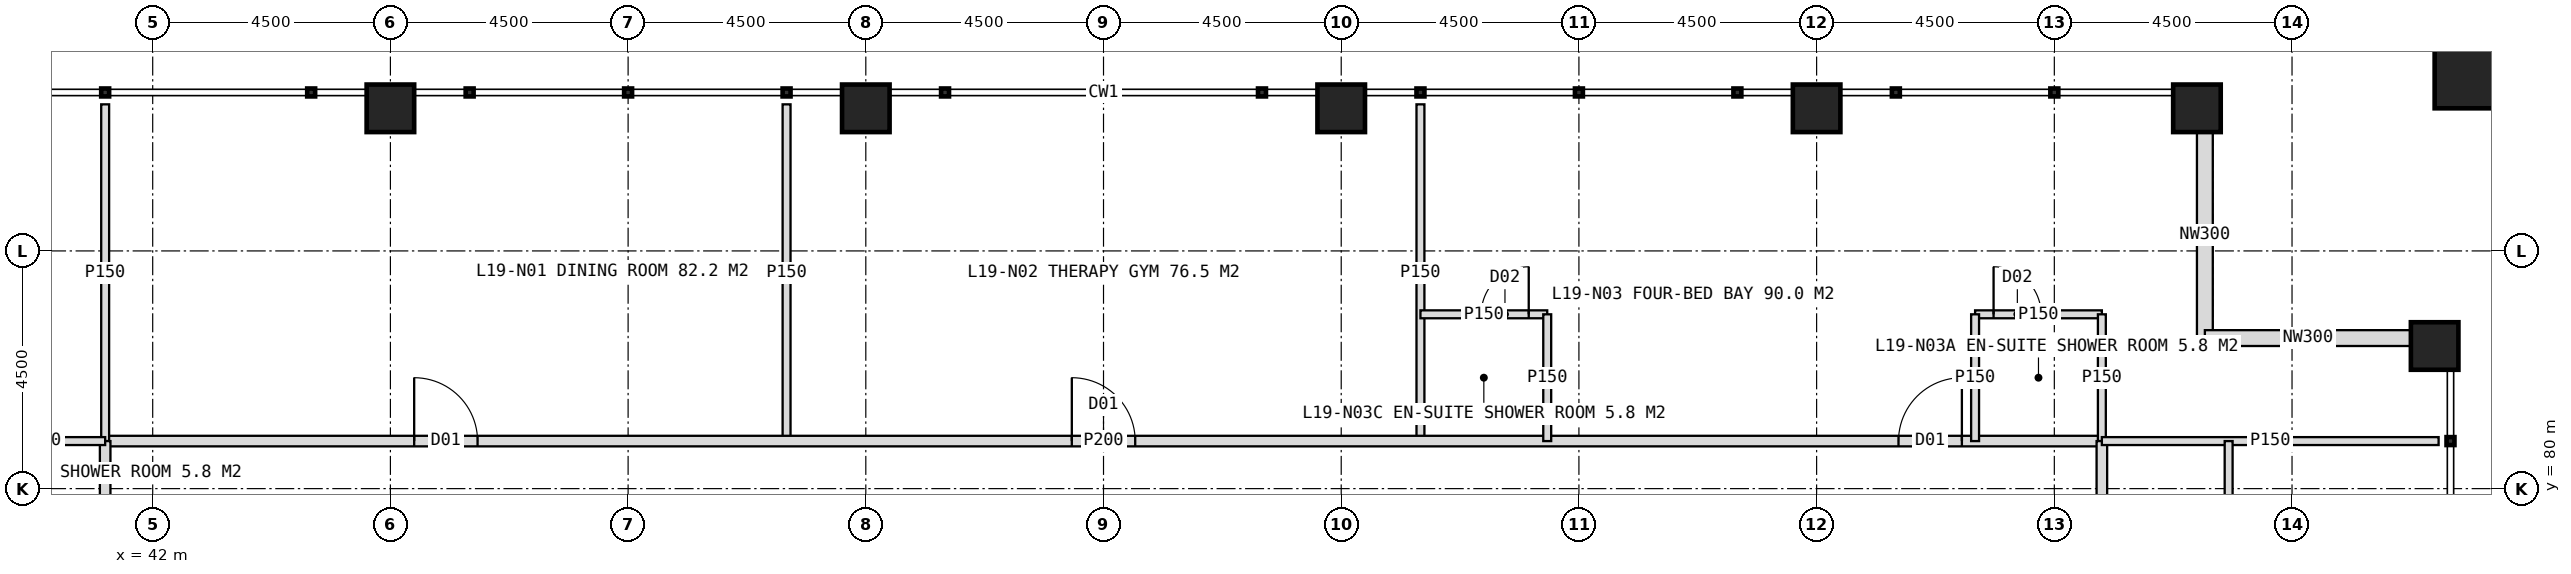
"""IFC4 building model, lengths in metres.
Left out: names, types, materials, properties, quantities, classifications, styles, units other than length and angle.
Written with IfcOpenShell. Run it as: python <this file> out.ifc"""

import sys

from ifc_helpers import new_model, si_unit, direction, frame, frame_2d, origin, origin_2d, place, context, subcontext, project, spatial, rectangle, hollow_rectangle, extrude, element, fill, save


model = new_model("IFC4")
c1 = context("Model", 3, precision=1e-05, world=origin(), true_north=direction((0.0, 1.0)))
c2 = subcontext(c1, "Body", "Model", "MODEL_VIEW")
j1 = project(units=[si_unit("LENGTHUNIT", "METRE"), si_unit("PLANEANGLEUNIT", "RADIAN")], contexts=[c1])
p1 = place(None, origin())
s1 = spatial("IfcSite", under=j1, at=p1, CompositionType="ELEMENT")
p2 = place(p1, origin())
s2 = spatial("IfcBuilding", under=s1, at=p2, CompositionType="ELEMENT")
p3 = place(p2, frame((0.0, 0.0, 83.0)))
s3 = spatial("IfcBuildingStorey", under=s2, at=p3, CompositionType="ELEMENT", Elevation=83.0)
for number, where, z_axis, x_axis in (
    (1, (46.5, 87.2, 0.0), (0.0, 0.0, 1.0), (1.0, 0.0, 0.0)),
    (2, (55.5, 87.2, 0.0), (0.0, 0.0, 1.0), (1.0, 0.0, 0.0)),
    (3, (64.5, 87.2, 0.0), (0.0, 0.0, 1.0), (1.0, 0.0, 0.0)),
    (4, (73.5, 87.2, 0.0), (0.0, 0.0, 1.0), (1.0, 0.0, 0.0)),
    (5, (80.7, 87.2, 0.0), (0.0, 0.0, 1.0), (1.0, 0.0, 0.0)),
    (6, (85.2, 82.7, 0.0), (0.0, 0.0, 1.0), (1.0, 0.0, 0.0)),
):
    element("IfcColumn", number, at=place(p3, frame(where, z_axis=z_axis, x_axis=x_axis)), inside=s3, PredefinedType="COLUMN", context=c2, shape_type="SweptSolid", body=[
        extrude(hollow_rectangle(XDim=0.9, YDim=0.9, WallThickness=0.08, at=origin_2d()), origin(), (0.0, 0.0, 1.0), 4.0),
    ])
p4 = place(p3, frame((86.1, 88.1, 0.0), z_axis=(0.0, 0.0, 1.0), x_axis=(1.0, 0.0, 0.0)))
e7 = element("IfcColumn", 7, at=p4, inside=s3, PredefinedType="COLUMN", context=c2, shape_type="SweptSolid", body=[
    extrude(hollow_rectangle(XDim=1.8, YDim=1.8, WallThickness=0.1, at=origin_2d()), origin(), (0.0, 0.0, 1.0), 4.0),
])
for number, where, z_axis, x_axis in (
    (8, (80.85, 86.75, 0.0), (0.0, 0.0, 1.0), (0.0, -1.0, 0.0)),
    (9, (80.85, 82.85, 0.0), (0.0, 0.0, 1.0), (1.0, 0.0, 0.0)),
):
    element("IfcWall", number, at=place(p3, frame(where, z_axis=z_axis, x_axis=x_axis)), inside=s3, PredefinedType="ELEMENTEDWALL", context=c2, shape_type="SweptSolid", body=[
        extrude(rectangle(XDim=3.9, YDim=0.3, at=frame_2d((1.95, 0.0))), origin(), (0.0, 0.0, 1.0), 2.95),
    ])
for number, where, z_axis, x_axis in (
    (10, (54.0, 80.9, 0.0), (0.0, 0.0, 1.0), (0.0, 1.0, 0.0)),
    (11, (66.0, 80.9, 0.0), (0.0, 0.0, 1.0), (0.0, 1.0, 0.0)),
):
    element("IfcWall", number, at=place(p3, frame(where, z_axis=z_axis, x_axis=x_axis)), inside=s3, PredefinedType="PARTITIONING", context=c2, shape_type="SweptSolid", body=[
        extrude(rectangle(XDim=6.375, YDim=0.15, at=frame_2d((3.188, 0.0))), origin(), (0.0, 0.0, 1.0), 3.75),
    ])
p5 = place(p3, frame((41.1, 80.9, 0.0), z_axis=(0.0, 0.0, 1.0), x_axis=(1.0, 0.0, 0.0)))
e12 = element("IfcWall", 12, at=p5, inside=s3, PredefinedType="PARTITIONING", context=c2, shape_type="SweptSolid", body=[
    extrude(rectangle(XDim=37.8, YDim=0.2, at=frame_2d((18.9, 0.0))), origin(), (0.0, 0.0, 1.0), 3.75),
])
p6 = place(p5, frame((5.85, 0.0, 0.0)))
e13 = element("IfcOpeningElement", 13, at=p6, cuts=e12, PredefinedType="OPENING", context=c2, shape_type="SweptSolid", body=[
    extrude(rectangle(XDim=1.2, YDim=2.2, at=frame_2d((0.6, 1.1))), frame((0.0, 0.11, 0.0), z_axis=(0.0, -1.0, 0.0), x_axis=(1.0, 0.0, 0.0)), (0.0, 0.0, 1.0), 0.22),
])
p7 = place(p5, frame((18.3, 0.0, 0.0)))
e14 = element("IfcOpeningElement", 14, at=p7, cuts=e12, PredefinedType="OPENING", context=c2, shape_type="SweptSolid", body=[
    extrude(rectangle(XDim=1.2, YDim=2.2, at=frame_2d((0.6, 1.1))), frame((0.0, 0.11, 0.0), z_axis=(0.0, -1.0, 0.0), x_axis=(1.0, 0.0, 0.0)), (0.0, 0.0, 1.0), 0.22),
])
p8 = place(p5, frame((33.95, 0.0, 0.0)))
e15 = element("IfcOpeningElement", 15, at=p8, cuts=e12, PredefinedType="OPENING", context=c2, shape_type="SweptSolid", body=[
    extrude(rectangle(XDim=1.2, YDim=2.2, at=frame_2d((0.6, 1.1))), frame((0.0, 0.11, 0.0), z_axis=(0.0, -1.0, 0.0), x_axis=(1.0, 0.0, 0.0)), (0.0, 0.0, 1.0), 0.22),
])
p9 = place(p3, frame((41.1, 80.9, 0.0), z_axis=(0.0, 0.0, 1.0), x_axis=(0.0, 1.0, 0.0)))
e16 = element("IfcWall", 16, at=p9, inside=s3, PredefinedType="PARTITIONING", context=c2, shape_type="SweptSolid", body=[
    extrude(rectangle(XDim=6.375, YDim=0.15, at=frame_2d((3.188, 0.0))), origin(), (0.0, 0.0, 1.0), 3.75),
])
p10 = place(p3, frame((76.5, 83.3, 0.0), z_axis=(0.0, 0.0, 1.0), x_axis=(1.0, 0.0, 0.0)))
e17 = element("IfcWall", 17, at=p10, inside=s3, PredefinedType="PARTITIONING", context=c2, shape_type="SweptSolid", body=[
    extrude(rectangle(XDim=2.4, YDim=0.15, at=frame_2d((1.2, 0.0))), origin(), (0.0, 0.0, 1.0), 3.75),
])
p11 = place(p10, frame((0.35, 0.0, 0.0)))
e18 = element("IfcOpeningElement", 18, at=p11, cuts=e17, PredefinedType="OPENING", context=c2, shape_type="SweptSolid", body=[
    extrude(rectangle(XDim=0.9, YDim=2.1, at=frame_2d((0.45, 1.05))), frame((0.0, 0.085, 0.0), z_axis=(0.0, -1.0, 0.0), x_axis=(1.0, 0.0, 0.0)), (0.0, 0.0, 1.0), 0.17),
])
p12 = place(p3, frame((76.5, 80.9, 0.0), z_axis=(0.0, 0.0, 1.0), x_axis=(0.0, 1.0, 0.0)))
e19 = element("IfcWall", 19, at=p12, inside=s3, PredefinedType="PARTITIONING", context=c2, shape_type="SweptSolid", body=[
    extrude(rectangle(XDim=2.4, YDim=0.15, at=frame_2d((1.2, 0.0))), origin(), (0.0, 0.0, 1.0), 3.75),
])
p13 = place(p3, frame((66.0, 83.3, 0.0), z_axis=(0.0, 0.0, 1.0), x_axis=(1.0, 0.0, 0.0)))
e20 = element("IfcWall", 20, at=p13, inside=s3, PredefinedType="PARTITIONING", context=c2, shape_type="SweptSolid", body=[
    extrude(rectangle(XDim=2.4, YDim=0.15, at=frame_2d((1.2, 0.0))), origin(), (0.0, 0.0, 1.0), 3.75),
])
p14 = place(p13, frame((1.15, 0.0, 0.0)))
e21 = element("IfcOpeningElement", 21, at=p14, cuts=e20, PredefinedType="OPENING", context=c2, shape_type="SweptSolid", body=[
    extrude(rectangle(XDim=0.9, YDim=2.1, at=frame_2d((0.45, 1.05))), frame((0.0, 0.085, 0.0), z_axis=(0.0, -1.0, 0.0), x_axis=(1.0, 0.0, 0.0)), (0.0, 0.0, 1.0), 0.17),
])
for number, where, z_axis, x_axis in (
    (22, (68.4, 80.9, 0.0), (0.0, 0.0, 1.0), (0.0, 1.0, 0.0)),
    (23, (78.9, 80.9, 0.0), (0.0, 0.0, 1.0), (0.0, 1.0, 0.0)),
):
    element("IfcWall", number, at=place(p3, frame(where, z_axis=z_axis, x_axis=x_axis)), inside=s3, PredefinedType="PARTITIONING", context=c2, shape_type="SweptSolid", body=[
        extrude(rectangle(XDim=2.4, YDim=0.15, at=frame_2d((1.2, 0.0))), origin(), (0.0, 0.0, 1.0), 3.75),
    ])
p15 = place(p3, frame((41.1, 43.1, 0.0), z_axis=(0.0, 0.0, 1.0), x_axis=(0.0, 1.0, 0.0)))
e24 = element("IfcWall", 24, at=p15, inside=s3, PredefinedType="PARTITIONING", context=c2, shape_type="SweptSolid", body=[
    extrude(rectangle(XDim=37.8, YDim=0.2, at=frame_2d((18.9, 0.0))), origin(), (0.0, 0.0, 1.0), 3.75),
])
p16 = place(p15, frame((2.45, 0.0, 0.0)))
e25 = element("IfcOpeningElement", 25, at=p16, cuts=e24, PredefinedType="OPENING", context=c2, shape_type="SweptSolid", body=[
    extrude(rectangle(XDim=1.2, YDim=2.2, at=frame_2d((0.6, 1.1))), frame((0.0, 0.11, 0.0), z_axis=(0.0, -1.0, 0.0), x_axis=(1.0, 0.0, 0.0)), (0.0, 0.0, 1.0), 0.22),
])
p17 = place(p15, frame((9.55, 0.0, 0.0)))
e26 = element("IfcOpeningElement", 26, at=p17, cuts=e24, PredefinedType="OPENING", context=c2, shape_type="SweptSolid", body=[
    extrude(rectangle(XDim=1.2, YDim=2.2, at=frame_2d((0.6, 1.1))), frame((0.0, 0.11, 0.0), z_axis=(0.0, -1.0, 0.0), x_axis=(1.0, 0.0, 0.0)), (0.0, 0.0, 1.0), 0.22),
])
p18 = place(p15, frame((15.05, 0.0, 0.0)))
e27 = element("IfcOpeningElement", 27, at=p18, cuts=e24, PredefinedType="OPENING", context=c2, shape_type="SweptSolid", body=[
    extrude(rectangle(XDim=1.2, YDim=2.2, at=frame_2d((0.6, 1.1))), frame((0.0, 0.11, 0.0), z_axis=(0.0, -1.0, 0.0), x_axis=(1.0, 0.0, 0.0)), (0.0, 0.0, 1.0), 0.22),
])
p19 = place(p15, frame((21.55, 0.0, 0.0)))
e28 = element("IfcOpeningElement", 28, at=p19, cuts=e24, PredefinedType="OPENING", context=c2, shape_type="SweptSolid", body=[
    extrude(rectangle(XDim=1.2, YDim=2.2, at=frame_2d((0.6, 1.1))), frame((0.0, 0.11, 0.0), z_axis=(0.0, -1.0, 0.0), x_axis=(1.0, 0.0, 0.0)), (0.0, 0.0, 1.0), 0.22),
])
p20 = place(p15, frame((33.95, 0.0, 0.0)))
e29 = element("IfcOpeningElement", 29, at=p20, cuts=e24, PredefinedType="OPENING", context=c2, shape_type="SweptSolid", body=[
    extrude(rectangle(XDim=1.2, YDim=2.2, at=frame_2d((0.6, 1.1))), frame((0.0, 0.11, 0.0), z_axis=(0.0, -1.0, 0.0), x_axis=(1.0, 0.0, 0.0)), (0.0, 0.0, 1.0), 0.22),
])
p21 = place(p3, frame((41.1, 80.9, 0.0), z_axis=(0.0, 0.0, 1.0), x_axis=(-1.0, 0.0, 0.0)))
e30 = element("IfcWall", 30, at=p21, inside=s3, PredefinedType="PARTITIONING", context=c2, shape_type="SweptSolid", body=[
    extrude(rectangle(XDim=2.4, YDim=0.15, at=frame_2d((1.2, 0.0))), origin(), (0.0, 0.0, 1.0), 3.75),
])
p22 = place(p3, frame((78.9, 80.9, 0.0), z_axis=(0.0, 0.0, 1.0), x_axis=(0.0, -1.0, 0.0)))
e31 = element("IfcWall", 31, at=p22, inside=s3, PredefinedType="PARTITIONING", context=c2, shape_type="SweptSolid", body=[
    extrude(rectangle(XDim=37.8, YDim=0.2, at=frame_2d((18.9, 0.0))), origin(), (0.0, 0.0, 1.0), 3.75),
])
p23 = place(p22, frame((2.45, 0.0, 0.0)))
e32 = element("IfcOpeningElement", 32, at=p23, cuts=e31, PredefinedType="OPENING", context=c2, shape_type="SweptSolid", body=[
    extrude(rectangle(XDim=1.2, YDim=2.2, at=frame_2d((0.6, 1.1))), frame((0.0, 0.11, 0.0), z_axis=(0.0, -1.0, 0.0), x_axis=(1.0, 0.0, 0.0)), (0.0, 0.0, 1.0), 0.22),
])
p24 = place(p22, frame((9.55, 0.0, 0.0)))
e33 = element("IfcOpeningElement", 33, at=p24, cuts=e31, PredefinedType="OPENING", context=c2, shape_type="SweptSolid", body=[
    extrude(rectangle(XDim=1.2, YDim=2.2, at=frame_2d((0.6, 1.1))), frame((0.0, 0.11, 0.0), z_axis=(0.0, -1.0, 0.0), x_axis=(1.0, 0.0, 0.0)), (0.0, 0.0, 1.0), 0.22),
])
p25 = place(p22, frame((15.05, 0.0, 0.0)))
e34 = element("IfcOpeningElement", 34, at=p25, cuts=e31, PredefinedType="OPENING", context=c2, shape_type="SweptSolid", body=[
    extrude(rectangle(XDim=1.2, YDim=2.2, at=frame_2d((0.6, 1.1))), frame((0.0, 0.11, 0.0), z_axis=(0.0, -1.0, 0.0), x_axis=(1.0, 0.0, 0.0)), (0.0, 0.0, 1.0), 0.22),
])
p26 = place(p22, frame((21.55, 0.0, 0.0)))
e35 = element("IfcOpeningElement", 35, at=p26, cuts=e31, PredefinedType="OPENING", context=c2, shape_type="SweptSolid", body=[
    extrude(rectangle(XDim=1.2, YDim=2.2, at=frame_2d((0.6, 1.1))), frame((0.0, 0.11, 0.0), z_axis=(0.0, -1.0, 0.0), x_axis=(1.0, 0.0, 0.0)), (0.0, 0.0, 1.0), 0.22),
])
p27 = place(p22, frame((33.95, 0.0, 0.0)))
e36 = element("IfcOpeningElement", 36, at=p27, cuts=e31, PredefinedType="OPENING", context=c2, shape_type="SweptSolid", body=[
    extrude(rectangle(XDim=1.2, YDim=2.2, at=frame_2d((0.6, 1.1))), frame((0.0, 0.11, 0.0), z_axis=(0.0, -1.0, 0.0), x_axis=(1.0, 0.0, 0.0)), (0.0, 0.0, 1.0), 0.22),
])
p28 = place(p3, frame((78.9, 80.9, 0.0), z_axis=(0.0, 0.0, 1.0), x_axis=(1.0, 0.0, 0.0)))
e37 = element("IfcWall", 37, at=p28, inside=s3, PredefinedType="PARTITIONING", context=c2, shape_type="SweptSolid", body=[
    extrude(rectangle(XDim=6.375, YDim=0.15, at=frame_2d((3.188, 0.0))), origin(), (0.0, 0.0, 1.0), 3.75),
])
p29 = place(p3, frame((81.3, 80.9, 0.0), z_axis=(0.0, 0.0, 1.0), x_axis=(0.0, -1.0, 0.0)))
e38 = element("IfcWall", 38, at=p29, inside=s3, PredefinedType="PARTITIONING", context=c2, shape_type="SweptSolid", body=[
    extrude(rectangle(XDim=3.9, YDim=0.15, at=frame_2d((1.95, 0.0))), origin(), (0.0, 0.0, 1.0), 3.75),
])
p30 = place(p29, frame((2.45, 0.0, 0.0)))
e39 = element("IfcOpeningElement", 39, at=p30, cuts=e38, PredefinedType="OPENING", context=c2, shape_type="SweptSolid", body=[
    extrude(rectangle(XDim=1.2, YDim=2.2, at=frame_2d((0.6, 1.1))), frame((0.0, 0.085, 0.0), z_axis=(0.0, -1.0, 0.0), x_axis=(1.0, 0.0, 0.0)), (0.0, 0.0, 1.0), 0.17),
])
p31 = place(p6, origin())
e40 = element("IfcDoor", 40, at=p31, inside=s3, OperationType="SINGLE_SWING_LEFT", PredefinedType="DOOR", context=c2, shape_type="SweptSolid", body=[
    extrude(rectangle(XDim=1.2, YDim=2.2, at=frame_2d((0.6, 1.1))), frame((0.0, 0.025, 0.0), z_axis=(0.0, -1.0, 0.0), x_axis=(1.0, 0.0, 0.0)), (0.0, 0.0, 1.0), 0.05),
])
fill(e13, e40)
p32 = place(p7, origin())
e41 = element("IfcDoor", 41, at=p32, inside=s3, OperationType="SINGLE_SWING_LEFT", PredefinedType="DOOR", context=c2, shape_type="SweptSolid", body=[
    extrude(rectangle(XDim=1.2, YDim=2.2, at=frame_2d((0.6, 1.1))), frame((0.0, 0.025, 0.0), z_axis=(0.0, -1.0, 0.0), x_axis=(1.0, 0.0, 0.0)), (0.0, 0.0, 1.0), 0.05),
])
fill(e14, e41)
p33 = place(p8, origin())
e42 = element("IfcDoor", 42, at=p33, inside=s3, OperationType="SINGLE_SWING_RIGHT", PredefinedType="DOOR", context=c2, shape_type="SweptSolid", body=[
    extrude(rectangle(XDim=1.2, YDim=2.2, at=frame_2d((0.6, 1.1))), frame((0.0, 0.025, 0.0), z_axis=(0.0, -1.0, 0.0), x_axis=(1.0, 0.0, 0.0)), (0.0, 0.0, 1.0), 0.05),
])
fill(e15, e42)
p34 = place(p11, origin())
e43 = element("IfcDoor", 43, at=p34, inside=s3, OperationType="SINGLE_SWING_LEFT", PredefinedType="DOOR", context=c2, shape_type="SweptSolid", body=[
    extrude(rectangle(XDim=0.9, YDim=2.1, at=frame_2d((0.45, 1.05))), frame((0.0, 0.025, 0.0), z_axis=(0.0, -1.0, 0.0), x_axis=(1.0, 0.0, 0.0)), (0.0, 0.0, 1.0), 0.05),
])
fill(e18, e43)
p35 = place(p14, origin())
e44 = element("IfcDoor", 44, at=p35, inside=s3, OperationType="SINGLE_SWING_RIGHT", PredefinedType="DOOR", context=c2, shape_type="SweptSolid", body=[
    extrude(rectangle(XDim=0.9, YDim=2.1, at=frame_2d((0.45, 1.05))), frame((0.0, 0.025, 0.0), z_axis=(0.0, -1.0, 0.0), x_axis=(1.0, 0.0, 0.0)), (0.0, 0.0, 1.0), 0.05),
])
fill(e21, e44)
save(model, sys.argv[1])
